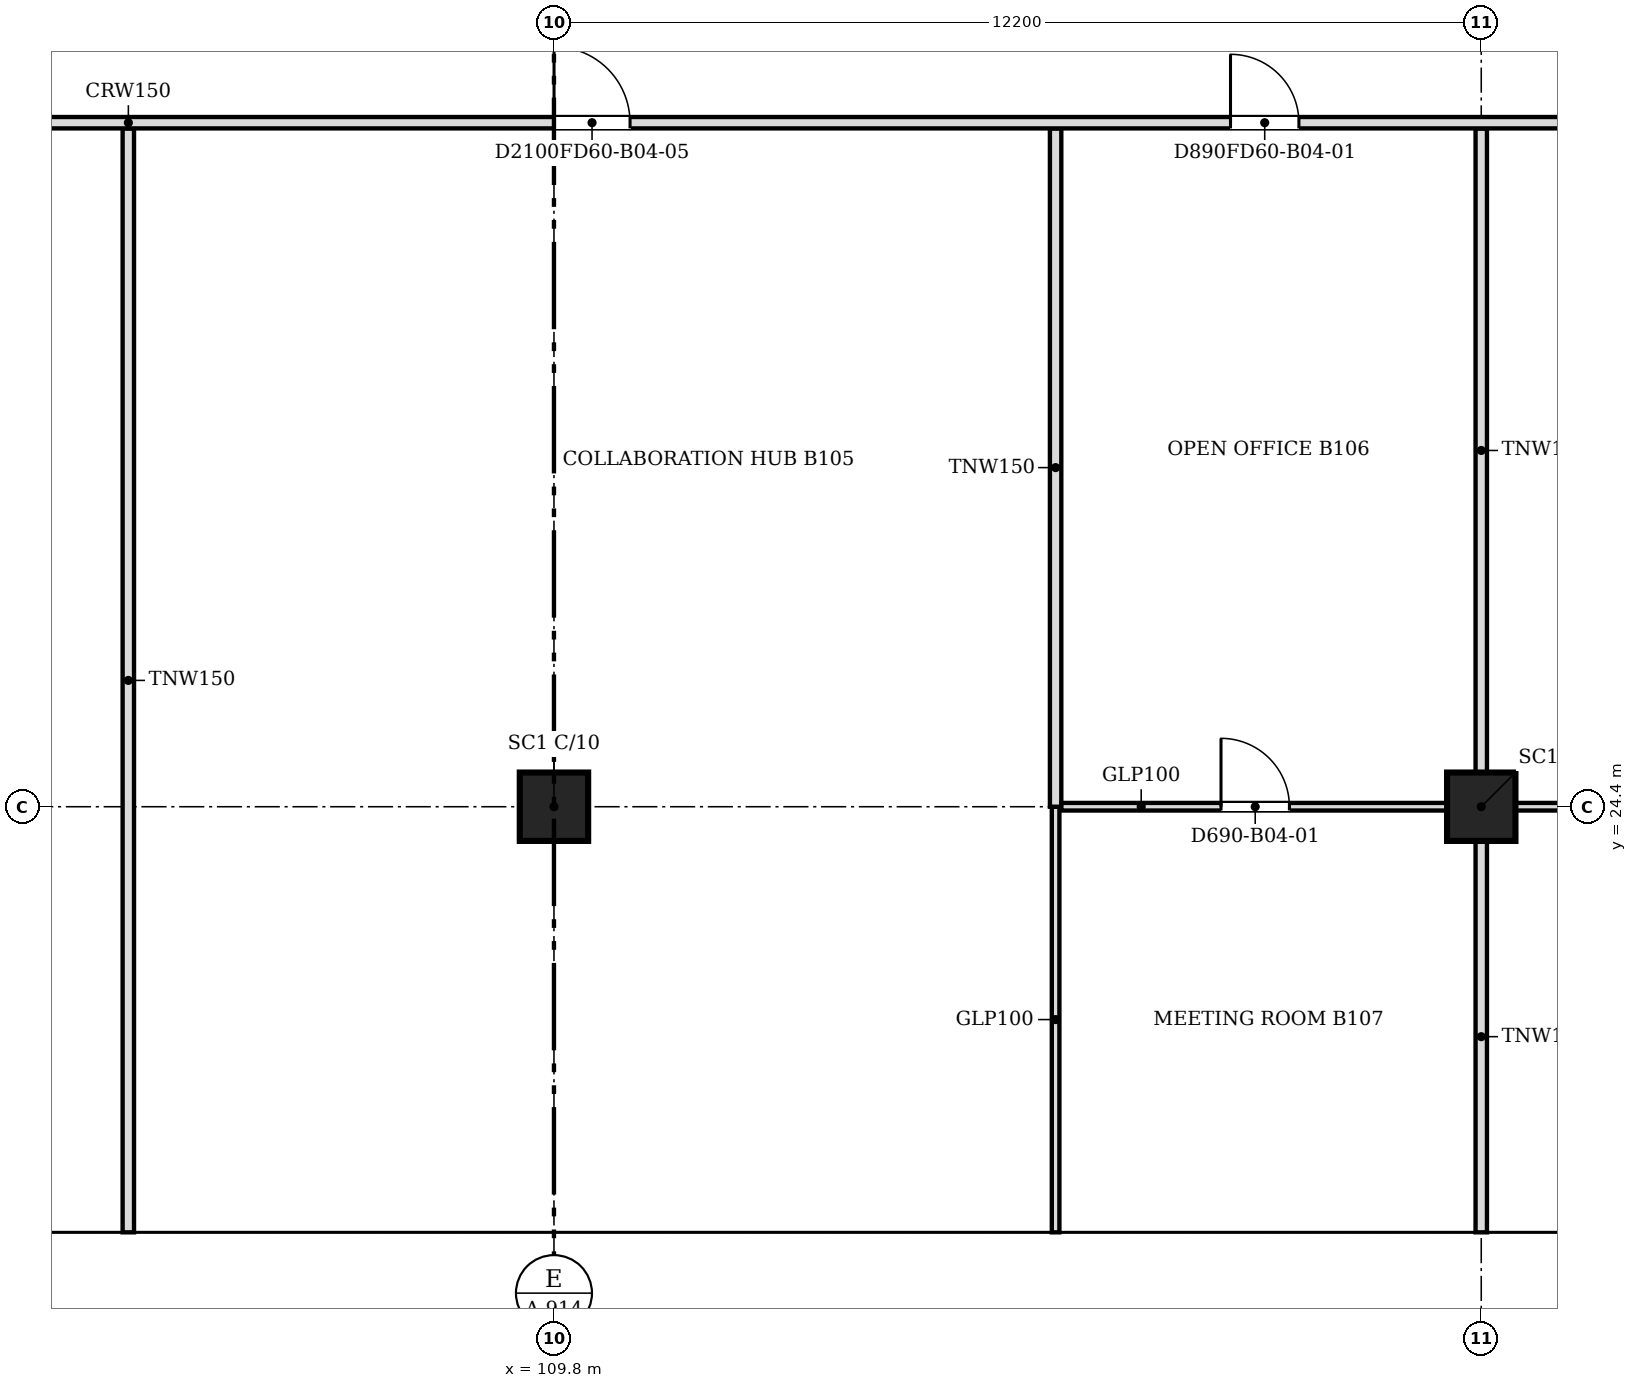
"""IFC4 building model, lengths in metres.
Left out: names, types, materials, properties, quantities, classifications, styles, units other than length and angle.
Written with IfcOpenShell. Run it as: python <this file> out.ifc"""

import sys

from ifc_helpers import new_model, si_unit, direction, frame, frame_2d, origin, origin_2d, place, context, subcontext, project, spatial, polyline, rectangle, outline, extrude, faceted_brep, source, transform, mapped, element, fill, save


model = new_model("IFC4")
c1 = context("Model", 3, precision=1e-05, world=origin(), true_north=direction((0.0, 1.0)))
c2 = subcontext(c1, "Body", "Model", "MODEL_VIEW")
j1 = project(units=[si_unit("LENGTHUNIT", "METRE"), si_unit("PLANEANGLEUNIT", "RADIAN")], contexts=[c1])
p1 = place(None, origin())
s1 = spatial("IfcSite", under=j1, at=p1, CompositionType="ELEMENT")
p2 = place(p1, origin())
s2 = spatial("IfcBuilding", under=s1, at=p2, CompositionType="ELEMENT")
p3 = place(p2, frame((0.0, 0.0, 37.2)))
s3 = spatial("IfcBuildingStorey", under=s2, at=p3, CompositionType="ELEMENT", Elevation=37.2)
for number, where, z_axis, x_axis in (
    (1, (109.8, 24.4, 0.0), (0.0, 0.0, 1.0), (1.0, 0.0, 0.0)),
    (2, (122.0, 24.4, 0.0), (0.0, 0.0, 1.0), (1.0, 0.0, 0.0)),
):
    element("IfcColumn", number, at=place(p3, frame(where, z_axis=z_axis, x_axis=x_axis)), inside=s3, PredefinedType="COLUMN", context=c2, shape_type="SweptSolid", body=[
        extrude(rectangle(XDim=0.9, YDim=0.9, at=origin_2d()), origin(), (0.0, 0.0, 1.0), 3.6),
    ])
m1 = source(origin(), c2, "Body", "Brep", [
    faceted_brep([(3.05, -0.25, 0.0), (6.1, -0.25, 3.8), (6.1, -0.25, 3.8), (3.05, -0.25, 7.6), (0.0, -0.25, 3.8), (0.0, 0.25, 3.8), (3.05, 0.25, 7.6), (6.1, 0.25, 3.8), (6.1, 0.25, 3.8), (3.05, 0.25, 0.0)], [[[0, 1, 2, 3, 4]], [[5, 6, 7, 8, 9]], [[9, 8, 1, 0]], [[7, 6, 3, 2]], [[6, 5, 4, 3]], [[5, 9, 0, 4]], [[1, 8, 7, 2]]]),
])
p4 = place(p3, frame((97.6, 18.55, -3.8), z_axis=(0.0, 0.0, 1.0), x_axis=(1.0, 0.0, 0.0)))
e3 = element("IfcWall", 3, at=p4, inside=s3, PredefinedType="SOLIDWALL", context=c2, shape_type="MappedRepresentation", body=[
    mapped(m1, transform((0.0, 0.0, 0.0), scale=1.0)),
])
m2 = source(origin(), c2, "Body", "SweptSolid", [
    extrude(outline(polyline([(3.05, 0.399), (5.78, 3.8), (3.05, 7.201), (0.321, 3.8), (3.05, 0.399)])), frame((0.0, 0.26, 0.0), z_axis=(0.0, -1.0, 0.0), x_axis=(1.0, 0.0, 0.0)), (0.0, 0.0, 1.0), 0.52),
])
p5 = place(p4, origin())
e4 = element("IfcOpeningElement", 4, at=p5, cuts=e3, PredefinedType="OPENING", context=c2, shape_type="MappedRepresentation", body=[
    mapped(m2, transform((0.0, 0.0, 0.0), scale=1.0)),
])
m3 = source(origin(), c2, "Body", "SweptSolid", [
    extrude(outline(polyline([(3.05, 0.0), (6.1, 3.8), (3.05, 7.6), (0.0, 3.8), (3.05, 0.0)])), frame((0.0, 0.25, 0.0), z_axis=(0.0, -1.0, 0.0), x_axis=(1.0, 0.0, 0.0)), (0.0, 0.0, 1.0), 0.5),
])
p6 = place(p3, frame((103.7, 18.55, -3.8), z_axis=(0.0, 0.0, 1.0), x_axis=(1.0, 0.0, 0.0)))
e5 = element("IfcWall", 5, at=p6, inside=s3, PredefinedType="SOLIDWALL", context=c2, shape_type="MappedRepresentation", body=[
    mapped(m3, transform((0.0, 0.0, 0.0), scale=1.0)),
])
p7 = place(p6, origin())
e6 = element("IfcOpeningElement", 6, at=p7, cuts=e5, PredefinedType="OPENING", context=c2, shape_type="MappedRepresentation", body=[
    mapped(m2, transform((0.0, 0.0, 0.0), scale=1.0)),
])
p8 = place(p3, frame((109.8, 18.55, -3.8), z_axis=(0.0, 0.0, 1.0), x_axis=(1.0, 0.0, 0.0)))
e7 = element("IfcWall", 7, at=p8, inside=s3, PredefinedType="SOLIDWALL", context=c2, shape_type="MappedRepresentation", body=[
    mapped(m1, transform((0.0, 0.0, 0.0), scale=1.0)),
])
p9 = place(p8, origin())
e8 = element("IfcOpeningElement", 8, at=p9, cuts=e7, PredefinedType="OPENING", context=c2, shape_type="MappedRepresentation", body=[
    mapped(m2, transform((0.0, 0.0, 0.0), scale=1.0)),
])
p10 = place(p3, frame((115.9, 18.55, -3.8), z_axis=(0.0, 0.0, 1.0), x_axis=(1.0, 0.0, 0.0)))
e9 = element("IfcWall", 9, at=p10, inside=s3, PredefinedType="SOLIDWALL", context=c2, shape_type="MappedRepresentation", body=[
    mapped(m3, transform((0.0, 0.0, 0.0), scale=1.0)),
])
p11 = place(p10, origin())
e10 = element("IfcOpeningElement", 10, at=p11, cuts=e9, PredefinedType="OPENING", context=c2, shape_type="MappedRepresentation", body=[
    mapped(m2, transform((0.0, 0.0, 0.0), scale=1.0)),
])
m4 = source(origin(), c2, "Body", "Brep", [
    faceted_brep([(3.05, -0.25, 0.0), (6.053, -0.25, 3.8), (3.05, -0.25, 7.6), (0.0, -0.25, 3.8), (0.0, 0.25, 3.8), (3.05, 0.25, 7.6), (6.007, 0.25, 3.859), (6.007, 0.25, 3.741), (3.05, 0.25, 0.0), (6.053, 0.0, 3.8)], [[[0, 1, 2, 3]], [[4, 5, 6, 7, 8]], [[8, 7, 9, 1, 0]], [[6, 5, 2, 1, 9]], [[5, 4, 3, 2]], [[4, 8, 0, 3]], [[9, 7, 6]]]),
])
p12 = place(p3, frame((122.0, 18.55, -3.8), z_axis=(0.0, 0.0, 1.0), x_axis=(1.0, 0.0, 0.0)))
e11 = element("IfcWall", 11, at=p12, inside=s3, PredefinedType="SOLIDWALL", context=c2, shape_type="MappedRepresentation", body=[
    mapped(m4, transform((0.0, 0.0, 0.0), scale=1.0)),
])
m5 = source(origin(), c2, "Body", "SweptSolid", [
    extrude(outline(polyline([(3.049, 0.401), (5.735, 3.8), (3.049, 7.199), (0.321, 3.8), (3.049, 0.401)])), frame((0.0, 0.26, 0.0), z_axis=(0.0, -1.0, 0.0), x_axis=(1.0, 0.0, 0.0)), (0.0, 0.0, 1.0), 0.52),
])
p13 = place(p12, origin())
e12 = element("IfcOpeningElement", 12, at=p13, cuts=e11, PredefinedType="OPENING", context=c2, shape_type="MappedRepresentation", body=[
    mapped(m5, transform((0.0, 0.0, 0.0), scale=1.0)),
])
p14 = place(p2, frame((0.0, 0.0, 41.0)))
s4 = spatial("IfcBuildingStorey", under=s2, at=p14, CompositionType="ELEMENT", Elevation=41.0)
p15 = place(p14, frame((100.65, 18.55, -3.8), z_axis=(0.0, 0.0, 1.0), x_axis=(1.0, 0.0, 0.0)))
e13 = element("IfcWall", 13, at=p15, inside=s4, PredefinedType="SOLIDWALL", context=c2, shape_type="MappedRepresentation", body=[
    mapped(m3, transform((0.0, 0.0, 0.0), scale=1.0)),
])
p16 = place(p15, origin())
e14 = element("IfcOpeningElement", 14, at=p16, cuts=e13, PredefinedType="OPENING", context=c2, shape_type="MappedRepresentation", body=[
    mapped(m2, transform((0.0, 0.0, 0.0), scale=1.0)),
])
p17 = place(p14, frame((106.75, 18.55, -3.8), z_axis=(0.0, 0.0, 1.0), x_axis=(1.0, 0.0, 0.0)))
e15 = element("IfcWall", 15, at=p17, inside=s4, PredefinedType="SOLIDWALL", context=c2, shape_type="MappedRepresentation", body=[
    mapped(m3, transform((0.0, 0.0, 0.0), scale=1.0)),
])
p18 = place(p17, origin())
e16 = element("IfcOpeningElement", 16, at=p18, cuts=e15, PredefinedType="OPENING", context=c2, shape_type="MappedRepresentation", body=[
    mapped(m2, transform((0.0, 0.0, 0.0), scale=1.0)),
])
p19 = place(p14, frame((112.85, 18.55, -3.8), z_axis=(0.0, 0.0, 1.0), x_axis=(1.0, 0.0, 0.0)))
e17 = element("IfcWall", 17, at=p19, inside=s4, PredefinedType="SOLIDWALL", context=c2, shape_type="MappedRepresentation", body=[
    mapped(m1, transform((0.0, 0.0, 0.0), scale=1.0)),
])
p20 = place(p19, origin())
e18 = element("IfcOpeningElement", 18, at=p20, cuts=e17, PredefinedType="OPENING", context=c2, shape_type="MappedRepresentation", body=[
    mapped(m2, transform((0.0, 0.0, 0.0), scale=1.0)),
])
p21 = place(p14, frame((118.95, 18.55, -3.8), z_axis=(0.0, 0.0, 1.0), x_axis=(1.0, 0.0, 0.0)))
e19 = element("IfcWall", 19, at=p21, inside=s4, PredefinedType="SOLIDWALL", context=c2, shape_type="MappedRepresentation", body=[
    mapped(m3, transform((0.0, 0.0, 0.0), scale=1.0)),
])
p22 = place(p21, origin())
e20 = element("IfcOpeningElement", 20, at=p22, cuts=e19, PredefinedType="OPENING", context=c2, shape_type="MappedRepresentation", body=[
    mapped(m2, transform((0.0, 0.0, 0.0), scale=1.0)),
])
p23 = place(p3, frame((104.2, 18.8, 0.0), z_axis=(0.0, 0.0, 1.0), x_axis=(0.0, 1.0, 0.0)))
e21 = element("IfcWall", 21, at=p23, inside=s3, PredefinedType="PARTITIONING", context=c2, shape_type="SweptSolid", body=[
    extrude(rectangle(XDim=14.524, YDim=0.15, at=frame_2d((7.262, 0.0))), origin(), (0.0, 0.0, 1.0), 3.067),
])
p24 = place(p3, frame((116.4, 18.8, 0.0), z_axis=(0.0, 0.0, 1.0), x_axis=(0.0, 1.0, 0.0)))
e22 = element("IfcWall", 22, at=p24, inside=s3, PredefinedType="PARTITIONING", context=c2, shape_type="SweptSolid", body=[
    extrude(rectangle(XDim=5.599, YDim=0.1, at=frame_2d((2.799, 0.0))), origin(), (0.0, 0.0, 1.0), 3.067),
])
p25 = place(p3, frame((122.0, 18.8, 0.0), z_axis=(0.0, 0.0, 1.0), x_axis=(0.0, 1.0, 0.0)))
e23 = element("IfcWall", 23, at=p25, inside=s3, PredefinedType="PARTITIONING", context=c2, shape_type="SweptSolid", body=[
    extrude(rectangle(XDim=5.149, YDim=0.15, at=frame_2d((2.574, 0.0))), origin(), (0.0, 0.0, 1.0), 3.067),
])
p26 = place(p3, frame((116.4, 24.4, 0.0), z_axis=(0.0, 0.0, 1.0), x_axis=(0.0, 1.0, 0.0)))
e24 = element("IfcWall", 24, at=p26, inside=s3, PredefinedType="PARTITIONING", context=c2, shape_type="SweptSolid", body=[
    extrude(rectangle(XDim=8.924, YDim=0.15, at=frame_2d((4.462, 0.0))), origin(), (0.0, 0.0, 1.0), 3.067),
])
p27 = place(p3, frame((121.549, 24.4, 0.0), z_axis=(0.0, 0.0, 1.0), x_axis=(-1.0, 0.0, 0.0)))
e25 = element("IfcWall", 25, at=p27, inside=s3, PredefinedType="PARTITIONING", context=c2, shape_type="SweptSolid", body=[
    extrude(rectangle(XDim=5.073, YDim=0.1, at=frame_2d((2.537, 0.0))), origin(), (0.0, 0.0, 1.0), 3.067),
])
m6 = source(origin(), c2, "Body", "SweptSolid", [
    extrude(rectangle(XDim=0.9, YDim=2.1, at=frame_2d((0.45, 1.05))), frame((0.0, 0.06, 0.0), z_axis=(0.0, -1.0, 0.0), x_axis=(1.0, 0.0, 0.0)), (0.0, 0.0, 1.0), 0.12),
])
p28 = place(p27, frame((2.073, 0.0, 0.0)))
e26 = element("IfcOpeningElement", 26, at=p28, cuts=e25, PredefinedType="OPENING", context=c2, shape_type="MappedRepresentation", body=[
    mapped(m6, transform((0.0, 0.0, 0.0), scale=1.0)),
])
p29 = place(p3, frame((133.664, 24.4, 0.0), z_axis=(0.0, 0.0, 1.0), x_axis=(-1.0, 0.0, 0.0)))
e27 = element("IfcWall", 27, at=p29, inside=s3, PredefinedType="PARTITIONING", context=c2, shape_type="SweptSolid", body=[
    extrude(rectangle(XDim=11.213, YDim=0.1, at=frame_2d((5.606, 0.0))), origin(), (0.0, 0.0, 1.0), 3.067),
])
p30 = place(p29, frame((8.113, 0.0, 0.0)))
e28 = element("IfcOpeningElement", 28, at=p30, cuts=e27, PredefinedType="OPENING", context=c2, shape_type="MappedRepresentation", body=[
    mapped(m6, transform((0.0, 0.0, 0.0), scale=1.0)),
])
p31 = place(p29, frame((2.512, 0.0, 0.0)))
e29 = element("IfcOpeningElement", 29, at=p31, cuts=e27, PredefinedType="OPENING", context=c2, shape_type="MappedRepresentation", body=[
    mapped(m6, transform((0.0, 0.0, 0.0), scale=1.0)),
])
p32 = place(p3, frame((122.0, 24.851, 0.0), z_axis=(0.0, 0.0, 1.0), x_axis=(0.0, 1.0, 0.0)))
e30 = element("IfcWall", 30, at=p32, inside=s3, PredefinedType="PARTITIONING", context=c2, shape_type="SweptSolid", body=[
    extrude(rectangle(XDim=8.473, YDim=0.15, at=frame_2d((4.236, 0.0))), origin(), (0.0, 0.0, 1.0), 3.067),
])
p33 = place(p3, frame((133.7, 33.4, 0.0), z_axis=(0.0, 0.0, 1.0), x_axis=(-1.0, 0.0, 0.0)))
e31 = element("IfcWall", 31, at=p33, inside=s3, PredefinedType="PARTITIONING", context=c2, shape_type="SweptSolid", body=[
    extrude(rectangle(XDim=47.8, YDim=0.15, at=frame_2d((23.9, 0.0))), origin(), (0.0, 0.0, 1.0), 3.067),
])
m7 = source(origin(), c2, "Body", "SweptSolid", [
    extrude(rectangle(XDim=0.9, YDim=2.1, at=frame_2d((0.45, 1.05))), frame((0.0, 0.085, 0.0), z_axis=(0.0, -1.0, 0.0), x_axis=(1.0, 0.0, 0.0)), (0.0, 0.0, 1.0), 0.17),
])
p34 = place(p33, frame((14.099, 0.0, 0.0)))
e32 = element("IfcOpeningElement", 32, at=p34, cuts=e31, PredefinedType="OPENING", context=c2, shape_type="MappedRepresentation", body=[
    mapped(m7, transform((0.0, 0.0, 0.0), scale=1.0)),
])
p35 = place(p33, frame((44.3, 0.0, 0.0)))
e33 = element("IfcOpeningElement", 33, at=p35, cuts=e31, PredefinedType="OPENING", context=c2, shape_type="MappedRepresentation", body=[
    mapped(m7, transform((0.0, 0.0, 0.0), scale=1.0)),
])
p36 = place(p33, frame((5.4, 0.0, 0.0)))
e34 = element("IfcOpeningElement", 34, at=p36, cuts=e31, PredefinedType="OPENING", context=c2, shape_type="MappedRepresentation", body=[
    mapped(m7, transform((0.0, 0.0, 0.0), scale=1.0)),
])
m8 = source(origin(), c2, "Body", "SweptSolid", [
    extrude(rectangle(XDim=1.0, YDim=2.1, at=frame_2d((0.5, 1.05))), frame((0.0, 0.085, 0.0), z_axis=(0.0, -1.0, 0.0), x_axis=(1.0, 0.0, 0.0)), (0.0, 0.0, 1.0), 0.17),
])
p37 = place(p33, frame((22.899, 0.0, 0.0)))
e35 = element("IfcOpeningElement", 35, at=p37, cuts=e31, PredefinedType="OPENING", context=c2, shape_type="MappedRepresentation", body=[
    mapped(m8, transform((0.0, 0.0, 0.0), scale=1.0)),
])
p38 = place(p33, frame((35.1, 0.0, 0.0)))
e36 = element("IfcOpeningElement", 36, at=p38, cuts=e31, PredefinedType="OPENING", context=c2, shape_type="MappedRepresentation", body=[
    mapped(m8, transform((0.0, 0.0, 0.0), scale=1.0)),
])
m9 = source(origin(), c2, "Body", "SweptSolid", [
    extrude(rectangle(XDim=0.9, YDim=2.1, at=frame_2d((0.45, 1.05))), frame((0.0, 0.025, 0.0), z_axis=(0.0, -1.0, 0.0), x_axis=(1.0, 0.0, 0.0)), (0.0, 0.0, 1.0), 0.05),
])
p39 = place(p28, origin())
e37 = element("IfcDoor", 37, at=p39, inside=s3, OperationType="SINGLE_SWING_RIGHT", PredefinedType="DOOR", context=c2, shape_type="MappedRepresentation", body=[
    mapped(m9, transform((0.0, 0.0, 0.0), scale=1.0)),
])
fill(e26, e37)
p40 = place(p34, origin())
e38 = element("IfcDoor", 38, at=p40, inside=s3, OperationType="SINGLE_SWING_RIGHT", PredefinedType="DOOR", context=c2, shape_type="MappedRepresentation", body=[
    mapped(m9, transform((0.0, 0.0, 0.0), scale=1.0)),
])
fill(e32, e38)
m10 = source(origin(), c2, "Body", "SweptSolid", [
    extrude(rectangle(XDim=1.0, YDim=2.1, at=frame_2d((0.5, 1.05))), frame((0.0, 0.025, 0.0), z_axis=(0.0, -1.0, 0.0), x_axis=(1.0, 0.0, 0.0)), (0.0, 0.0, 1.0), 0.05),
])
p41 = place(p37, origin())
e39 = element("IfcDoor", 39, at=p41, inside=s3, OperationType="SINGLE_SWING_RIGHT", PredefinedType="DOOR", context=c2, shape_type="MappedRepresentation", body=[
    mapped(m10, transform((0.0, 0.0, 0.0), scale=1.0)),
])
fill(e35, e39)
save(model, sys.argv[1])
